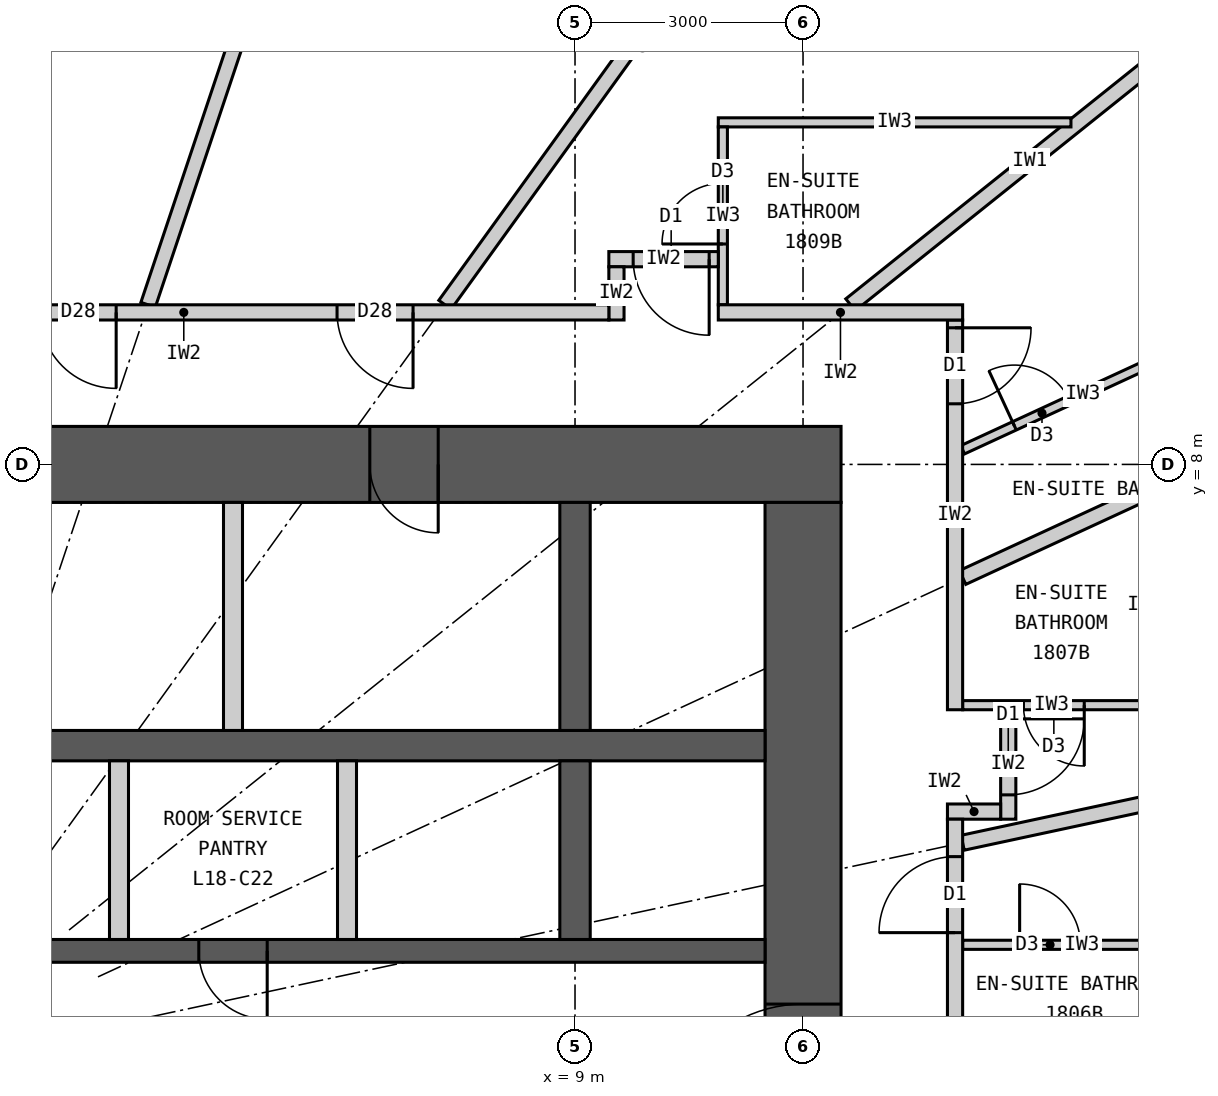
"""IFC4 building model, lengths in metres.
Left out: names, types, materials, properties, quantities, classifications, styles, units other than length and angle.
Written with IfcOpenShell. Run it as: python <this file> out.ifc"""

import sys

from ifc_helpers import new_model, si_unit, direction, frame, frame_2d, origin, place, context, subcontext, project, spatial, rectangle, extrude, element, fill, save


model = new_model("IFC4")
c1 = context("Model", 3, precision=1e-05, world=origin(), true_north=direction((0.0, 1.0)))
c2 = subcontext(c1, "Body", "Model", "MODEL_VIEW")
j1 = project(units=[si_unit("LENGTHUNIT", "METRE"), si_unit("PLANEANGLEUNIT", "RADIAN")], contexts=[c1])
p1 = place(None, origin())
s1 = spatial("IfcSite", under=j1, at=p1, CompositionType="ELEMENT")
p2 = place(p1, origin())
s2 = spatial("IfcBuilding", under=s1, at=p2, CompositionType="ELEMENT")
p3 = place(p2, frame((0.0, 0.0, 73.8)))
s3 = spatial("IfcBuildingStorey", under=s2, at=p3, CompositionType="ELEMENT", Elevation=73.8)
p4 = place(p3, frame((-12.5, 8.0, 0.0), z_axis=(0.0, 0.0, 1.0), x_axis=(1.0, 0.0, 0.0)))
e1 = element("IfcWall", 1, at=p4, inside=s3, PredefinedType="SHEAR", context=c2, shape_type="SweptSolid", body=[
    extrude(rectangle(XDim=25.0, YDim=1.0, at=frame_2d((12.5, 0.0))), origin(), (0.0, 0.0, 1.0), 3.3),
])
p5 = place(p4, frame((11.2, 0.0, 0.0)))
e2 = element("IfcOpeningElement", 2, at=p5, cuts=e1, PredefinedType="OPENING", context=c2, shape_type="SweptSolid", body=[
    extrude(rectangle(XDim=1.2, YDim=2.2, at=frame_2d((0.6, 1.1))), frame((0.0, 0.51, 0.0), z_axis=(0.0, -1.0, 0.0), x_axis=(1.0, 0.0, 0.0)), (0.0, 0.0, 1.0), 1.02),
])
p6 = place(p4, frame((18.8, 0.0, 0.0)))
e3 = element("IfcOpeningElement", 3, at=p6, cuts=e1, PredefinedType="OPENING", context=c2, shape_type="SweptSolid", body=[
    extrude(rectangle(XDim=0.9, YDim=2.2, at=frame_2d((0.45, 1.1))), frame((0.0, 0.51, 0.0), z_axis=(0.0, -1.0, 0.0), x_axis=(1.0, 0.0, 0.0)), (0.0, 0.0, 1.0), 1.02),
])
p7 = place(p3, frame((12.0, -7.5, 0.0), z_axis=(0.0, 0.0, 1.0), x_axis=(0.0, 1.0, 0.0)))
e4 = element("IfcWall", 4, at=p7, inside=s3, PredefinedType="SHEAR", context=c2, shape_type="SweptSolid", body=[
    extrude(rectangle(XDim=15.0, YDim=1.0, at=frame_2d((7.5, 0.0))), origin(), (0.0, 0.0, 1.0), 3.3),
])
p8 = place(p7, frame((6.6, 0.0, 0.0)))
e5 = element("IfcOpeningElement", 5, at=p8, cuts=e4, PredefinedType="OPENING", context=c2, shape_type="SweptSolid", body=[
    extrude(rectangle(XDim=1.8, YDim=2.2, at=frame_2d((0.9, 1.1))), frame((0.0, 0.51, 0.0), z_axis=(0.0, -1.0, 0.0), x_axis=(1.0, 0.0, 0.0)), (0.0, 0.0, 1.0), 1.02),
])
p9 = place(p3, frame((-11.5, 4.3, 0.0), z_axis=(0.0, 0.0, 1.0), x_axis=(1.0, 0.0, 0.0)))
e6 = element("IfcWall", 6, at=p9, inside=s3, PredefinedType="SHEAR", context=c2, shape_type="SweptSolid", body=[
    extrude(rectangle(XDim=23.0, YDim=0.4, at=frame_2d((11.5, 0.0))), origin(), (0.0, 0.0, 1.0), 3.3),
])
p10 = place(p3, frame((-11.5, 1.6, 0.0), z_axis=(0.0, 0.0, 1.0), x_axis=(1.0, 0.0, 0.0)))
e7 = element("IfcWall", 7, at=p10, inside=s3, PredefinedType="SHEAR", context=c2, shape_type="SweptSolid", body=[
    extrude(rectangle(XDim=23.0, YDim=0.3, at=frame_2d((11.5, 0.0))), origin(), (0.0, 0.0, 1.0), 3.3),
])
p11 = place(p10, frame((0.45, 0.0, 0.0)))
e8 = element("IfcOpeningElement", 8, at=p11, cuts=e7, PredefinedType="OPENING", context=c2, shape_type="SweptSolid", body=[
    extrude(rectangle(XDim=1.1, YDim=2.2, at=frame_2d((0.55, 1.1))), frame((0.0, 0.16, 0.0), z_axis=(0.0, -1.0, 0.0), x_axis=(1.0, 0.0, 0.0)), (0.0, 0.0, 1.0), 0.32),
])
p12 = place(p10, frame((3.45, 0.0, 0.0)))
e9 = element("IfcOpeningElement", 9, at=p12, cuts=e7, PredefinedType="OPENING", context=c2, shape_type="SweptSolid", body=[
    extrude(rectangle(XDim=1.1, YDim=2.2, at=frame_2d((0.55, 1.1))), frame((0.0, 0.16, 0.0), z_axis=(0.0, -1.0, 0.0), x_axis=(1.0, 0.0, 0.0)), (0.0, 0.0, 1.0), 0.32),
])
p13 = place(p10, frame((9.55, 0.0, 0.0)))
e10 = element("IfcOpeningElement", 10, at=p13, cuts=e7, PredefinedType="OPENING", context=c2, shape_type="SweptSolid", body=[
    extrude(rectangle(XDim=0.9, YDim=2.2, at=frame_2d((0.45, 1.1))), frame((0.0, 0.16, 0.0), z_axis=(0.0, -1.0, 0.0), x_axis=(1.0, 0.0, 0.0)), (0.0, 0.0, 1.0), 0.32),
])
p14 = place(p10, frame((15.55, 0.0, 0.0)))
e11 = element("IfcOpeningElement", 11, at=p14, cuts=e7, PredefinedType="OPENING", context=c2, shape_type="SweptSolid", body=[
    extrude(rectangle(XDim=0.9, YDim=2.2, at=frame_2d((0.45, 1.1))), frame((0.0, 0.16, 0.0), z_axis=(0.0, -1.0, 0.0), x_axis=(1.0, 0.0, 0.0)), (0.0, 0.0, 1.0), 0.32),
])
p15 = place(p3, frame((9.0, 4.5, 0.0), z_axis=(0.0, 0.0, 1.0), x_axis=(0.0, 1.0, 0.0)))
e12 = element("IfcWall", 12, at=p15, inside=s3, PredefinedType="SHEAR", context=c2, shape_type="SweptSolid", body=[
    extrude(rectangle(XDim=3.0, YDim=0.4, at=frame_2d((1.5, 0.0))), origin(), (0.0, 0.0, 1.0), 3.3),
])
p16 = place(p3, frame((9.0, 1.75, 0.0), z_axis=(0.0, 0.0, 1.0), x_axis=(0.0, 1.0, 0.0)))
e13 = element("IfcWall", 13, at=p16, inside=s3, PredefinedType="SHEAR", context=c2, shape_type="SweptSolid", body=[
    extrude(rectangle(XDim=2.35, YDim=0.4, at=frame_2d((1.175, 0.0))), origin(), (0.0, 0.0, 1.0), 3.3),
])
p17 = place(p3, frame((4.5, 4.5, 0.0), z_axis=(0.0, 0.0, 1.0), x_axis=(0.0, 1.0, 0.0)))
e14 = element("IfcWall", 14, at=p17, inside=s3, PredefinedType="PARTITIONING", context=c2, shape_type="SweptSolid", body=[
    extrude(rectangle(XDim=3.0, YDim=0.25, at=frame_2d((1.5, 0.0))), origin(), (0.0, 0.0, 1.0), 3.3),
])
for number, where, z_axis, x_axis in (
    (15, (3.0, 1.75, 0.0), (0.0, 0.0, 1.0), (0.0, 1.0, 0.0)),
    (16, (6.0, 1.75, 0.0), (0.0, 0.0, 1.0), (0.0, 1.0, 0.0)),
):
    element("IfcWall", number, at=place(p3, frame(where, z_axis=z_axis, x_axis=x_axis)), inside=s3, PredefinedType="PARTITIONING", context=c2, shape_type="SweptSolid", body=[
        extrude(rectangle(XDim=2.35, YDim=0.25, at=frame_2d((1.175, 0.0))), origin(), (0.0, 0.0, 1.0), 3.3),
    ])
p18 = place(p3, frame((14.1, 3.022, 0.0), z_axis=(0.0, 0.0, 1.0), x_axis=(0.977790014929, 0.209586943072, 0.0)))
e17 = element("IfcWall", 17, at=p18, inside=s3, PredefinedType="PARTITIONING", context=c2, shape_type="SweptSolid", body=[
    extrude(rectangle(XDim=10.087, YDim=0.2, at=frame_2d((5.043, 0.0))), origin(), (0.0, 0.0, 1.0), 2.32),
])
p19 = place(p3, frame((14.1, 6.512, 0.0), z_axis=(0.0, 0.0, 1.0), x_axis=(0.907832871056, 0.419332181247, 0.0)))
e18 = element("IfcWall", 18, at=p19, inside=s3, PredefinedType="PARTITIONING", context=c2, shape_type="SweptSolid", body=[
    extrude(rectangle(XDim=8.023, YDim=0.2, at=frame_2d((4.011, 0.0))), origin(), (0.0, 0.0, 1.0), 2.32),
])
p20 = place(p3, frame((12.625, 10.1, 0.0), z_axis=(0.0, 0.0, 1.0), x_axis=(0.780892451574, 0.624665493744, 0.0)))
e19 = element("IfcWall", 19, at=p20, inside=s3, PredefinedType="PARTITIONING", context=c2, shape_type="SweptSolid", body=[
    extrude(rectangle(XDim=6.045, YDim=0.2, at=frame_2d((3.022, 0.0))), origin(), (0.0, 0.0, 1.0), 2.32),
])
p21 = place(p3, frame((7.289, 10.1, 0.0), z_axis=(0.0, 0.0, 1.0), x_axis=(0.585198353053, 0.810890182197, 0.0)))
e20 = element("IfcWall", 20, at=p21, inside=s3, PredefinedType="PARTITIONING", context=c2, shape_type="SweptSolid", body=[
    extrude(rectangle(XDim=8.36, YDim=0.2, at=frame_2d((4.18, 0.0))), origin(), (0.0, 0.0, 1.0), 2.32),
])
p22 = place(p3, frame((3.383, 10.1, 0.0), z_axis=(0.0, 0.0, 1.0), x_axis=(0.31759592231, 0.948226149256, 0.0)))
e21 = element("IfcWall", 21, at=p22, inside=s3, PredefinedType="PARTITIONING", context=c2, shape_type="SweptSolid", body=[
    extrude(rectangle(XDim=9.098, YDim=0.2, at=frame_2d((4.549, 0.0))), origin(), (0.0, 0.0, 1.0), 2.32),
])
p23 = place(p3, frame((14.1, 1.68, 0.0), z_axis=(0.0, 0.0, 1.0), x_axis=(1.0, 0.0, 0.0)))
e22 = element("IfcWall", 22, at=p23, inside=s3, PredefinedType="PARTITIONING", context=c2, shape_type="SweptSolid", body=[
    extrude(rectangle(XDim=3.14, YDim=0.12, at=frame_2d((1.57, 0.0))), origin(), (0.0, 0.0, 1.0), 3.12),
])
p24 = place(p23, frame((0.75, 0.0, 0.0)))
e23 = element("IfcOpeningElement", 23, at=p24, cuts=e22, PredefinedType="OPENING", context=c2, shape_type="SweptSolid", body=[
    extrude(rectangle(XDim=0.8, YDim=2.1, at=frame_2d((0.4, 1.05))), frame((0.0, 0.07, 0.0), z_axis=(0.0, -1.0, 0.0), x_axis=(1.0, 0.0, 0.0)), (0.0, 0.0, 1.0), 0.14),
])
p25 = place(p3, frame((14.1, 4.833, 0.0), z_axis=(0.0, 0.0, 1.0), x_axis=(1.0, 0.0, 0.0)))
e24 = element("IfcWall", 24, at=p25, inside=s3, PredefinedType="PARTITIONING", context=c2, shape_type="SweptSolid", body=[
    extrude(rectangle(XDim=2.34, YDim=0.12, at=frame_2d((1.17, 0.0))), origin(), (0.0, 0.0, 1.0), 3.12),
])
p26 = place(p25, frame((0.8, 0.0, 0.0)))
e25 = element("IfcOpeningElement", 25, at=p26, cuts=e24, PredefinedType="OPENING", context=c2, shape_type="SweptSolid", body=[
    extrude(rectangle(XDim=0.8, YDim=2.1, at=frame_2d((0.4, 1.05))), frame((0.0, 0.07, 0.0), z_axis=(0.0, -1.0, 0.0), x_axis=(1.0, 0.0, 0.0)), (0.0, 0.0, 1.0), 0.14),
])
p27 = place(p3, frame((14.1, 8.193, 0.0), z_axis=(0.0, 0.0, 1.0), x_axis=(0.907836493557, 0.419324338628, 0.0)))
e26 = element("IfcWall", 26, at=p27, inside=s3, PredefinedType="PARTITIONING", context=c2, shape_type="SweptSolid", body=[
    extrude(rectangle(XDim=3.49, YDim=0.12, at=frame_2d((1.745, 0.0))), origin(), (0.0, 0.0, 1.0), 3.12),
])
p28 = place(p27, frame((0.75, 0.0, 0.0)))
e27 = element("IfcOpeningElement", 27, at=p28, cuts=e26, PredefinedType="OPENING", context=c2, shape_type="SweptSolid", body=[
    extrude(rectangle(XDim=0.8, YDim=2.1, at=frame_2d((0.4, 1.05))), frame((0.0, 0.07, 0.0), z_axis=(0.0, -1.0, 0.0), x_axis=(1.0, 0.0, 0.0)), (0.0, 0.0, 1.0), 0.14),
])
p29 = place(p3, frame((15.525, 12.5, 0.0), z_axis=(0.0, 0.0, 1.0), x_axis=(-1.0, 0.0, 0.0)))
e28 = element("IfcWall", 28, at=p29, inside=s3, PredefinedType="PARTITIONING", context=c2, shape_type="SweptSolid", body=[
    extrude(rectangle(XDim=4.64, YDim=0.12, at=frame_2d((2.32, 0.0))), origin(), (0.0, 0.0, 1.0), 3.12),
])
p30 = place(p3, frame((10.945, 10.1, 0.0), z_axis=(0.0, 0.0, 1.0), x_axis=(0.0, 1.0, 0.0)))
e29 = element("IfcWall", 29, at=p30, inside=s3, PredefinedType="PARTITIONING", context=c2, shape_type="SweptSolid", body=[
    extrude(rectangle(XDim=2.34, YDim=0.12, at=frame_2d((1.17, 0.0))), origin(), (0.0, 0.0, 1.0), 3.12),
])
p31 = place(p30, frame((0.8, 0.0, 0.0)))
e30 = element("IfcOpeningElement", 30, at=p31, cuts=e29, PredefinedType="OPENING", context=c2, shape_type="SweptSolid", body=[
    extrude(rectangle(XDim=0.8, YDim=2.1, at=frame_2d((0.4, 1.05))), frame((0.0, 0.07, 0.0), z_axis=(0.0, -1.0, 0.0), x_axis=(1.0, 0.0, 0.0)), (0.0, 0.0, 1.0), 0.14),
])
p32 = place(p3, frame((14.7, 3.333, 0.0), z_axis=(0.0, 0.0, 1.0), x_axis=(0.0, 1.0, 0.0)))
e31 = element("IfcWall", 31, at=p32, inside=s3, PredefinedType="PARTITIONING", context=c2, shape_type="SweptSolid", body=[
    extrude(rectangle(XDim=1.44, YDim=0.2, at=frame_2d((0.72, 0.0))), origin(), (0.0, 0.0, 1.0), 3.12),
])
p33 = place(p32, frame((0.32, 0.0, 0.0)))
e32 = element("IfcOpeningElement", 32, at=p33, cuts=e31, PredefinedType="OPENING", context=c2, shape_type="SweptSolid", body=[
    extrude(rectangle(XDim=1.0, YDim=2.2, at=frame_2d((0.5, 1.1))), frame((0.0, 0.11, 0.0), z_axis=(0.0, -1.0, 0.0), x_axis=(1.0, 0.0, 0.0)), (0.0, 0.0, 1.0), 0.22),
])
p34 = place(p3, frame((13.9, 3.433, 0.0), z_axis=(0.0, 0.0, 1.0), x_axis=(1.0, 0.0, 0.0)))
e33 = element("IfcWall", 33, at=p34, inside=s3, PredefinedType="PARTITIONING", context=c2, shape_type="SweptSolid", body=[
    extrude(rectangle(XDim=0.7, YDim=0.2, at=frame_2d((0.35, 0.0))), origin(), (0.0, 0.0, 1.0), 2.32),
])
p35 = place(p3, frame((9.445, 10.7, 0.0), z_axis=(0.0, 0.0, 1.0), x_axis=(1.0, 0.0, 0.0)))
e34 = element("IfcWall", 34, at=p35, inside=s3, PredefinedType="PARTITIONING", context=c2, shape_type="SweptSolid", body=[
    extrude(rectangle(XDim=1.44, YDim=0.2, at=frame_2d((0.72, 0.0))), origin(), (0.0, 0.0, 1.0), 3.12),
])
p36 = place(p35, frame((0.32, 0.0, 0.0)))
e35 = element("IfcOpeningElement", 35, at=p36, cuts=e34, PredefinedType="OPENING", context=c2, shape_type="SweptSolid", body=[
    extrude(rectangle(XDim=1.0, YDim=2.2, at=frame_2d((0.5, 1.1))), frame((0.0, 0.11, 0.0), z_axis=(0.0, -1.0, 0.0), x_axis=(1.0, 0.0, 0.0)), (0.0, 0.0, 1.0), 0.22),
])
p37 = place(p3, frame((9.545, 9.9, 0.0), z_axis=(0.0, 0.0, 1.0), x_axis=(0.0, 1.0, 0.0)))
e36 = element("IfcWall", 36, at=p37, inside=s3, PredefinedType="PARTITIONING", context=c2, shape_type="SweptSolid", body=[
    extrude(rectangle(XDim=0.7, YDim=0.2, at=frame_2d((0.35, 0.0))), origin(), (0.0, 0.0, 1.0), 3.12),
])
p38 = place(p3, frame((14.0, -9.9, 0.0), z_axis=(0.0, 0.0, 1.0), x_axis=(0.0, 1.0, 0.0)))
e37 = element("IfcWall", 37, at=p38, inside=s3, PredefinedType="PARTITIONING", context=c2, shape_type="SweptSolid", body=[
    extrude(rectangle(XDim=13.232, YDim=0.2, at=frame_2d((6.616, 0.0))), origin(), (0.0, 0.0, 1.0), 3.12),
])
p39 = place(p38, frame((4.948, 0.0, 0.0)))
e38 = element("IfcOpeningElement", 38, at=p39, cuts=e37, PredefinedType="OPENING", context=c2, shape_type="SweptSolid", body=[
    extrude(rectangle(XDim=1.0, YDim=2.2, at=frame_2d((0.5, 1.1))), frame((0.0, 0.11, 0.0), z_axis=(0.0, -1.0, 0.0), x_axis=(1.0, 0.0, 0.0)), (0.0, 0.0, 1.0), 0.22),
])
p40 = place(p38, frame((8.718, 0.0, 0.0)))
e39 = element("IfcOpeningElement", 39, at=p40, cuts=e37, PredefinedType="OPENING", context=c2, shape_type="SweptSolid", body=[
    extrude(rectangle(XDim=1.0, YDim=2.2, at=frame_2d((0.5, 1.1))), frame((0.0, 0.11, 0.0), z_axis=(0.0, -1.0, 0.0), x_axis=(1.0, 0.0, 0.0)), (0.0, 0.0, 1.0), 0.22),
])
p41 = place(p38, frame((11.74, 0.0, 0.0)))
e40 = element("IfcOpeningElement", 40, at=p41, cuts=e37, PredefinedType="OPENING", context=c2, shape_type="SweptSolid", body=[
    extrude(rectangle(XDim=1.0, YDim=2.2, at=frame_2d((0.5, 1.1))), frame((0.0, 0.11, 0.0), z_axis=(0.0, -1.0, 0.0), x_axis=(1.0, 0.0, 0.0)), (0.0, 0.0, 1.0), 0.22),
])
p42 = place(p3, frame((14.0, 4.772, 0.0), z_axis=(0.0, 0.0, 1.0), x_axis=(0.0, 1.0, 0.0)))
e41 = element("IfcWall", 41, at=p42, inside=s3, PredefinedType="PARTITIONING", context=c2, shape_type="SweptSolid", body=[
    extrude(rectangle(XDim=5.127, YDim=0.2, at=frame_2d((2.564, 0.0))), origin(), (0.0, 0.0, 1.0), 3.12),
])
p43 = place(p42, frame((4.025, 0.0, 0.0)))
e42 = element("IfcOpeningElement", 42, at=p43, cuts=e41, PredefinedType="OPENING", context=c2, shape_type="SweptSolid", body=[
    extrude(rectangle(XDim=1.0, YDim=2.2, at=frame_2d((0.5, 1.1))), frame((0.0, 0.11, 0.0), z_axis=(0.0, -1.0, 0.0), x_axis=(1.0, 0.0, 0.0)), (0.0, 0.0, 1.0), 0.22),
])
p44 = place(p3, frame((-1.74, 10.0, 0.0), z_axis=(0.0, 0.0, 1.0), x_axis=(1.0, 0.0, 0.0)))
e43 = element("IfcWall", 43, at=p44, inside=s3, PredefinedType="PARTITIONING", context=c2, shape_type="SweptSolid", body=[
    extrude(rectangle(XDim=11.185, YDim=0.2, at=frame_2d((5.593, 0.0))), origin(), (0.0, 0.0, 1.0), 3.12),
])
p45 = place(p44, frame((7.609, 0.0, 0.0)))
e44 = element("IfcOpeningElement", 44, at=p45, cuts=e43, PredefinedType="OPENING", context=c2, shape_type="SweptSolid", body=[
    extrude(rectangle(XDim=1.0, YDim=2.2, at=frame_2d((0.5, 1.1))), frame((0.0, 0.11, 0.0), z_axis=(0.0, -1.0, 0.0), x_axis=(1.0, 0.0, 0.0)), (0.0, 0.0, 1.0), 0.22),
])
p46 = place(p44, frame((3.703, 0.0, 0.0)))
e45 = element("IfcOpeningElement", 45, at=p46, cuts=e43, PredefinedType="OPENING", context=c2, shape_type="SweptSolid", body=[
    extrude(rectangle(XDim=1.0, YDim=2.2, at=frame_2d((0.5, 1.1))), frame((0.0, 0.11, 0.0), z_axis=(0.0, -1.0, 0.0), x_axis=(1.0, 0.0, 0.0)), (0.0, 0.0, 1.0), 0.22),
])
p47 = place(p3, frame((10.885, 10.0, 0.0), z_axis=(0.0, 0.0, 1.0), x_axis=(1.0, 0.0, 0.0)))
e46 = element("IfcWall", 46, at=p47, inside=s3, PredefinedType="PARTITIONING", context=c2, shape_type="SweptSolid", body=[
    extrude(rectangle(XDim=3.215, YDim=0.2, at=frame_2d((1.607, 0.0))), origin(), (0.0, 0.0, 1.0), 3.12),
])
p48 = place(p24, origin())
e47 = element("IfcDoor", 47, at=p48, inside=s3, OperationType="SINGLE_SWING_LEFT", PredefinedType="DOOR", context=c2, shape_type="SweptSolid", body=[
    extrude(rectangle(XDim=0.8, YDim=2.1, at=frame_2d((0.4, 1.05))), frame((0.0, 0.025, 0.0), z_axis=(0.0, -1.0, 0.0), x_axis=(1.0, 0.0, 0.0)), (0.0, 0.0, 1.0), 0.05),
])
fill(e23, e47)
p49 = place(p41, origin())
e48 = element("IfcDoor", 48, at=p49, inside=s3, OperationType="SINGLE_SWING_LEFT", PredefinedType="DOOR", context=c2, shape_type="SweptSolid", body=[
    extrude(rectangle(XDim=1.0, YDim=2.2, at=frame_2d((0.5, 1.1))), frame((0.0, 0.025, 0.0), z_axis=(0.0, -1.0, 0.0), x_axis=(1.0, 0.0, 0.0)), (0.0, 0.0, 1.0), 0.05),
])
fill(e40, e48)
p50 = place(p26, origin())
e49 = element("IfcDoor", 49, at=p50, inside=s3, OperationType="SINGLE_SWING_RIGHT", PredefinedType="DOOR", context=c2, shape_type="SweptSolid", body=[
    extrude(rectangle(XDim=0.8, YDim=2.1, at=frame_2d((0.4, 1.05))), frame((0.0, 0.025, 0.0), z_axis=(0.0, -1.0, 0.0), x_axis=(1.0, 0.0, 0.0)), (0.0, 0.0, 1.0), 0.05),
])
fill(e25, e49)
p51 = place(p33, origin())
e50 = element("IfcDoor", 50, at=p51, inside=s3, OperationType="SINGLE_SWING_RIGHT", PredefinedType="DOOR", context=c2, shape_type="SweptSolid", body=[
    extrude(rectangle(XDim=1.0, YDim=2.2, at=frame_2d((0.5, 1.1))), frame((0.0, 0.025, 0.0), z_axis=(0.0, -1.0, 0.0), x_axis=(1.0, 0.0, 0.0)), (0.0, 0.0, 1.0), 0.05),
])
fill(e32, e50)
p52 = place(p28, origin())
e51 = element("IfcDoor", 51, at=p52, inside=s3, OperationType="SINGLE_SWING_LEFT", PredefinedType="DOOR", context=c2, shape_type="SweptSolid", body=[
    extrude(rectangle(XDim=0.8, YDim=2.1, at=frame_2d((0.4, 1.05))), frame((0.0, 0.025, 0.0), z_axis=(0.0, -1.0, 0.0), x_axis=(1.0, 0.0, 0.0)), (0.0, 0.0, 1.0), 0.05),
])
fill(e27, e51)
p53 = place(p43, origin())
e52 = element("IfcDoor", 52, at=p53, inside=s3, OperationType="SINGLE_SWING_RIGHT", PredefinedType="DOOR", context=c2, shape_type="SweptSolid", body=[
    extrude(rectangle(XDim=1.0, YDim=2.2, at=frame_2d((0.5, 1.1))), frame((0.0, 0.025, 0.0), z_axis=(0.0, -1.0, 0.0), x_axis=(1.0, 0.0, 0.0)), (0.0, 0.0, 1.0), 0.05),
])
fill(e42, e52)
p54 = place(p31, origin())
e53 = element("IfcDoor", 53, at=p54, inside=s3, OperationType="SINGLE_SWING_LEFT", PredefinedType="DOOR", context=c2, shape_type="SweptSolid", body=[
    extrude(rectangle(XDim=0.8, YDim=2.1, at=frame_2d((0.4, 1.05))), frame((0.0, 0.025, 0.0), z_axis=(0.0, -1.0, 0.0), x_axis=(1.0, 0.0, 0.0)), (0.0, 0.0, 1.0), 0.05),
])
fill(e30, e53)
p55 = place(p36, origin())
e54 = element("IfcDoor", 54, at=p55, inside=s3, OperationType="SINGLE_SWING_RIGHT", PredefinedType="DOOR", context=c2, shape_type="SweptSolid", body=[
    extrude(rectangle(XDim=1.0, YDim=2.2, at=frame_2d((0.5, 1.1))), frame((0.0, 0.025, 0.0), z_axis=(0.0, -1.0, 0.0), x_axis=(1.0, 0.0, 0.0)), (0.0, 0.0, 1.0), 0.05),
])
fill(e35, e54)
p56 = place(p45, origin())
e55 = element("IfcDoor", 55, at=p56, inside=s3, OperationType="SINGLE_SWING_RIGHT", PredefinedType="DOOR", context=c2, shape_type="SweptSolid", body=[
    extrude(rectangle(XDim=1.0, YDim=2.2, at=frame_2d((0.5, 1.1))), frame((0.0, 0.025, 0.0), z_axis=(0.0, -1.0, 0.0), x_axis=(1.0, 0.0, 0.0)), (0.0, 0.0, 1.0), 0.05),
])
fill(e44, e55)
p57 = place(p46, origin())
e56 = element("IfcDoor", 56, at=p57, inside=s3, OperationType="SINGLE_SWING_RIGHT", PredefinedType="DOOR", context=c2, shape_type="SweptSolid", body=[
    extrude(rectangle(XDim=1.0, YDim=2.2, at=frame_2d((0.5, 1.1))), frame((0.0, 0.025, 0.0), z_axis=(0.0, -1.0, 0.0), x_axis=(1.0, 0.0, 0.0)), (0.0, 0.0, 1.0), 0.05),
])
fill(e45, e56)
p58 = place(p6, origin())
e57 = element("IfcDoor", 57, at=p58, inside=s3, OperationType="SINGLE_SWING_RIGHT", PredefinedType="DOOR", context=c2, shape_type="SweptSolid", body=[
    extrude(rectangle(XDim=0.9, YDim=2.2, at=frame_2d((0.45, 1.1))), frame((0.0, 0.025, 0.0), z_axis=(0.0, -1.0, 0.0), x_axis=(1.0, 0.0, 0.0)), (0.0, 0.0, 1.0), 0.05),
])
fill(e3, e57)
p59 = place(p14, origin())
e58 = element("IfcDoor", 58, at=p59, inside=s3, OperationType="SINGLE_SWING_RIGHT", PredefinedType="DOOR", context=c2, shape_type="SweptSolid", body=[
    extrude(rectangle(XDim=0.9, YDim=2.2, at=frame_2d((0.45, 1.1))), frame((0.0, 0.025, 0.0), z_axis=(0.0, -1.0, 0.0), x_axis=(1.0, 0.0, 0.0)), (0.0, 0.0, 1.0), 0.05),
])
fill(e11, e58)
p60 = place(p8, origin())
e59 = element("IfcDoor", 59, at=p60, inside=s3, OperationType="DOUBLE_DOOR_DOUBLE_SWING", PredefinedType="DOOR", context=c2, shape_type="SweptSolid", body=[
    extrude(rectangle(XDim=1.8, YDim=2.2, at=frame_2d((0.9, 1.1))), frame((0.0, 0.025, 0.0), z_axis=(0.0, -1.0, 0.0), x_axis=(1.0, 0.0, 0.0)), (0.0, 0.0, 1.0), 0.05),
])
fill(e5, e59)
save(model, sys.argv[1])
